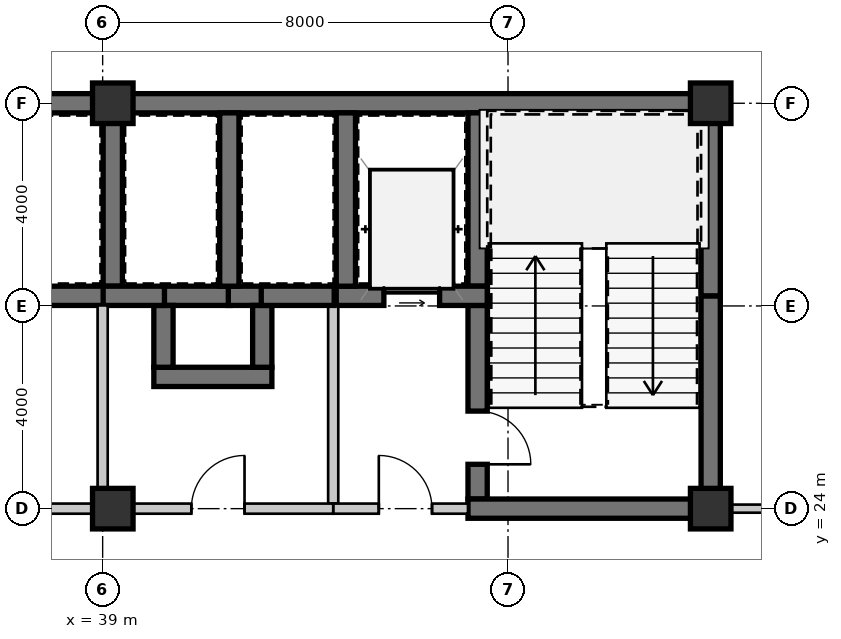
"""IFC4 building model, lengths in metres.
Left out: names, types, materials, properties, quantities, classifications, styles, units other than length and angle.
Written with IfcOpenShell. Run it as: python <this file> out.ifc"""

import sys

from ifc_helpers import new_model, si_unit, direction, frame, frame_2d, origin, origin_2d, place, context, subcontext, project, spatial, rectangle, extrude, source, transform, mapped, element, fill, save


model = new_model("IFC4")
c1 = context("Model", 3, precision=1e-05, world=origin(), true_north=direction((0.0, 1.0)))
c2 = subcontext(c1, "Body", "Model", "MODEL_VIEW")
j1 = project(units=[si_unit("LENGTHUNIT", "METRE"), si_unit("PLANEANGLEUNIT", "RADIAN")], contexts=[c1])
p1 = place(None, origin())
s1 = spatial("IfcSite", under=j1, at=p1, CompositionType="ELEMENT")
p2 = place(p1, origin())
s2 = spatial("IfcBuilding", under=s1, at=p2, CompositionType="ELEMENT")
p3 = place(p2, frame((0.0, 0.0, 38.85)))
s3 = spatial("IfcBuildingStorey", under=s2, at=p3, CompositionType="ELEMENT", Elevation=38.85)
m1 = source(origin(), c2, "Body", "SweptSolid", [
    extrude(rectangle(XDim=0.8, YDim=0.8, at=origin_2d()), origin(), (0.0, 0.0, 1.0), 3.15),
])
for number, where, z_axis, x_axis in (
    (1, (39.2, 24.0, 0.0), (0.0, 0.0, 1.0), (1.0, 0.0, 0.0)),
    (2, (51.0, 24.0, 0.0), (0.0, 0.0, 1.0), (1.0, 0.0, 0.0)),
    (3, (39.2, 32.0, 0.0), (0.0, 0.0, 1.0), (1.0, 0.0, 0.0)),
    (4, (51.0, 32.0, 0.0), (0.0, 0.0, 1.0), (1.0, 0.0, 0.0)),
):
    element("IfcColumn", number, at=place(p3, frame(where, z_axis=z_axis, x_axis=x_axis)), inside=s3, PredefinedType="COLUMN", context=c2, shape_type="MappedRepresentation", body=[
        mapped(m1, transform((0.0, 0.0, 0.0), scale=1.0)),
    ])
m2 = source(origin(), c2, "Body", "SweptSolid", [
    extrude(rectangle(XDim=11.2, YDim=0.38, at=frame_2d((5.6, 0.0))), origin(), (0.0, 0.0, 1.0), 2.93),
])
p4 = place(p3, frame((28.0, 32.0, 0.0), z_axis=(0.0, 0.0, 1.0), x_axis=(1.0, 0.0, 0.0)))
e5 = element("IfcWall", 5, at=p4, inside=s3, PredefinedType="SHEAR", context=c2, shape_type="MappedRepresentation", body=[
    mapped(m2, transform((0.0, 0.0, 0.0), scale=1.0)),
])
m3 = source(origin(), c2, "Body", "SweptSolid", [
    extrude(rectangle(XDim=11.99, YDim=0.38, at=frame_2d((5.995, 0.0))), origin(), (0.0, 0.0, 1.0), 2.93),
])
p5 = place(p3, frame((39.2, 32.0, 0.0), z_axis=(0.0, 0.0, 1.0), x_axis=(1.0, 0.0, 0.0)))
e6 = element("IfcWall", 6, at=p5, inside=s3, PredefinedType="SHEAR", context=c2, shape_type="MappedRepresentation", body=[
    mapped(m3, transform((0.0, 0.0, 0.0), scale=1.0)),
])
m4 = source(origin(), c2, "Body", "SweptSolid", [
    extrude(rectangle(XDim=4.01, YDim=0.38, at=frame_2d((2.005, 0.0))), origin(), (0.0, 0.0, 1.0), 2.93),
])
p6 = place(p3, frame((51.0, 24.19, 0.0), z_axis=(0.0, 0.0, 1.0), x_axis=(0.0, 1.0, 0.0)))
e7 = element("IfcWall", 7, at=p6, inside=s3, PredefinedType="SHEAR", context=c2, shape_type="MappedRepresentation", body=[
    mapped(m4, transform((0.0, 0.0, 0.0), scale=1.0)),
])
m5 = source(origin(), c2, "Body", "SweptSolid", [
    extrude(rectangle(XDim=3.61, YDim=0.38, at=frame_2d((1.805, 0.0))), origin(), (0.0, 0.0, 1.0), 2.93),
])
p7 = place(p3, frame((51.0, 28.2, 0.0), z_axis=(0.0, 0.0, 1.0), x_axis=(0.0, 1.0, 0.0)))
e8 = element("IfcWall", 8, at=p7, inside=s3, PredefinedType="SHEAR", context=c2, shape_type="MappedRepresentation", body=[
    mapped(m5, transform((0.0, 0.0, 0.0), scale=1.0)),
])
m6 = source(origin(), c2, "Body", "SweptSolid", [
    extrude(rectangle(XDim=3.42, YDim=0.38, at=frame_2d((1.71, 0.0))), origin(), (0.0, 0.0, 1.0), 2.93),
])
p8 = place(p3, frame((46.4, 31.81, 0.0), z_axis=(0.0, 0.0, 1.0), x_axis=(0.0, -1.0, 0.0)))
e9 = element("IfcWall", 9, at=p8, inside=s3, PredefinedType="SHEAR", context=c2, shape_type="MappedRepresentation", body=[
    mapped(m6, transform((0.0, 0.0, 0.0), scale=1.0)),
])
m7 = source(origin(), c2, "Body", "SweptSolid", [
    extrude(rectangle(XDim=3.82, YDim=0.38, at=frame_2d((1.91, 0.0))), origin(), (0.0, 0.0, 1.0), 2.93),
])
p9 = place(p3, frame((46.4, 28.01, 0.0), z_axis=(0.0, 0.0, 1.0), x_axis=(0.0, -1.0, 0.0)))
e10 = element("IfcWall", 10, at=p9, inside=s3, PredefinedType="SHEAR", context=c2, shape_type="MappedRepresentation", body=[
    mapped(m7, transform((0.0, 0.0, 0.0), scale=1.0)),
])
m8 = source(origin(), c2, "Body", "SweptSolid", [
    extrude(rectangle(XDim=1.05, YDim=2.1, at=frame_2d((0.525, 1.05))), frame((0.0, 0.2, 0.0), z_axis=(0.0, -1.0, 0.0), x_axis=(1.0, 0.0, 0.0)), (0.0, 0.0, 1.0), 0.4),
])
p10 = place(p9, frame((2.085, 0.0, 0.0)))
e11 = element("IfcOpeningElement", 11, at=p10, cuts=e10, PredefinedType="OPENING", context=c2, shape_type="MappedRepresentation", body=[
    mapped(m8, transform((0.0, 0.0, 0.0), scale=1.0)),
])
m9 = source(origin(), c2, "Body", "SweptSolid", [
    extrude(rectangle(XDim=4.98, YDim=0.38, at=frame_2d((2.49, 0.0))), origin(), (0.0, 0.0, 1.0), 2.93),
])
p11 = place(p3, frame((46.21, 24.0, 0.0), z_axis=(0.0, 0.0, 1.0), x_axis=(1.0, 0.0, 0.0)))
e12 = element("IfcWall", 12, at=p11, inside=s3, PredefinedType="SHEAR", context=c2, shape_type="MappedRepresentation", body=[
    mapped(m9, transform((0.0, 0.0, 0.0), scale=1.0)),
])
m10 = source(origin(), c2, "Body", "SweptSolid", [
    extrude(rectangle(XDim=2.98, YDim=0.38, at=frame_2d((1.49, 0.0))), origin(), (0.0, 0.0, 1.0), 2.93),
])
p12 = place(p3, frame((43.61, 28.2, 0.0), z_axis=(0.0, 0.0, 1.0), x_axis=(1.0, 0.0, 0.0)))
e13 = element("IfcWall", 13, at=p12, inside=s3, PredefinedType="SHEAR", context=c2, shape_type="MappedRepresentation", body=[
    mapped(m10, transform((0.0, 0.0, 0.0), scale=1.0)),
])
m11 = source(origin(), c2, "Body", "SweptSolid", [
    extrude(rectangle(XDim=1.1, YDim=2.15, at=frame_2d((0.55, 1.075))), frame((0.0, 0.2, 0.0), z_axis=(0.0, -1.0, 0.0), x_axis=(1.0, 0.0, 0.0)), (0.0, 0.0, 1.0), 0.4),
])
p13 = place(p12, frame((0.94, 0.0, 0.0)))
e14 = element("IfcOpeningElement", 14, at=p13, cuts=e13, PredefinedType="OPENING", context=c2, shape_type="MappedRepresentation", body=[
    mapped(m11, transform((0.0, 0.0, 0.0), scale=1.0)),
])
p14 = place(p3, frame((43.8, 31.81, 0.0), z_axis=(0.0, 0.0, 1.0), x_axis=(0.0, -1.0, 0.0)))
e15 = element("IfcWall", 15, at=p14, inside=s3, PredefinedType="SHEAR", context=c2, shape_type="MappedRepresentation", body=[
    mapped(m6, transform((0.0, 0.0, 0.0), scale=1.0)),
])
m12 = source(origin(), c2, "Body", "SweptSolid", [
    extrude(rectangle(XDim=3.91, YDim=0.2, at=frame_2d((1.955, 0.0))), origin(), (0.0, 0.0, 1.0), 2.93),
])
p15 = place(p3, frame((43.55, 28.01, 0.0), z_axis=(0.0, 0.0, 1.0), x_axis=(0.0, -1.0, 0.0)))
e16 = element("IfcWall", 16, at=p15, inside=s3, PredefinedType="SOLIDWALL", context=c2, shape_type="MappedRepresentation", body=[
    mapped(m12, transform((0.0, 0.0, 0.0), scale=1.0)),
])
m13 = source(origin(), c2, "Body", "SweptSolid", [
    extrude(rectangle(XDim=2.66, YDim=0.2, at=frame_2d((1.33, 0.0))), origin(), (0.0, 0.0, 1.0), 2.397),
])
p16 = place(p3, frame((43.55, 24.0, 0.0), z_axis=(0.0, 0.0, 1.0), x_axis=(1.0, 0.0, 0.0)))
e17 = element("IfcWall", 17, at=p16, inside=s3, PredefinedType="SOLIDWALL", context=c2, shape_type="MappedRepresentation", body=[
    mapped(m13, transform((0.0, 0.0, 0.0), scale=1.0)),
])
m14 = source(origin(), c2, "Body", "SweptSolid", [
    extrude(rectangle(XDim=1.05, YDim=2.1, at=frame_2d((0.525, 1.05))), frame((0.0, 0.11, 0.0), z_axis=(0.0, -1.0, 0.0), x_axis=(1.0, 0.0, 0.0)), (0.0, 0.0, 1.0), 0.22),
])
p17 = place(p16, frame((0.9, 0.0, 0.0)))
e18 = element("IfcOpeningElement", 18, at=p17, cuts=e17, PredefinedType="OPENING", context=c2, shape_type="MappedRepresentation", body=[
    mapped(m14, transform((0.0, 0.0, 0.0), scale=1.0)),
])
m15 = source(origin(), c2, "Body", "SweptSolid", [
    extrude(rectangle(XDim=1.32, YDim=0.38, at=frame_2d((0.66, 0.0))), origin(), (0.0, 0.0, 1.0), 2.93),
])
p18 = place(p3, frame((41.52, 28.2, 0.0), z_axis=(0.0, 0.0, 1.0), x_axis=(-1.0, 0.0, 0.0)))
e19 = element("IfcWall", 19, at=p18, inside=s3, PredefinedType="SHEAR", context=c2, shape_type="MappedRepresentation", body=[
    mapped(m15, transform((0.0, 0.0, 0.0), scale=1.0)),
])
m16 = source(origin(), c2, "Body", "SweptSolid", [
    extrude(rectangle(XDim=0.67, YDim=0.38, at=frame_2d((0.335, 0.0))), origin(), (0.0, 0.0, 1.0), 2.93),
])
p19 = place(p3, frame((42.15, 28.2, 0.0), z_axis=(0.0, 0.0, 1.0), x_axis=(-1.0, 0.0, 0.0)))
e20 = element("IfcWall", 20, at=p19, inside=s3, PredefinedType="SHEAR", context=c2, shape_type="MappedRepresentation", body=[
    mapped(m16, transform((0.0, 0.0, 0.0), scale=1.0)),
])
m17 = source(origin(), c2, "Body", "SweptSolid", [
    extrude(rectangle(XDim=2.33, YDim=0.38, at=frame_2d((1.165, 0.0))), origin(), (0.0, 0.0, 1.0), 2.93),
])
p20 = place(p3, frame((40.01, 26.6, 0.0), z_axis=(0.0, 0.0, 1.0), x_axis=(1.0, 0.0, 0.0)))
e21 = element("IfcWall", 21, at=p20, inside=s3, PredefinedType="SHEAR", context=c2, shape_type="MappedRepresentation", body=[
    mapped(m17, transform((0.0, 0.0, 0.0), scale=1.0)),
])
m18 = source(origin(), c2, "Body", "SweptSolid", [
    extrude(rectangle(XDim=1.22, YDim=0.38, at=frame_2d((0.61, 0.0))), origin(), (0.0, 0.0, 1.0), 2.93),
])
for number, where, z_axis, x_axis in (
    (22, (40.2, 28.01, 0.0), (0.0, 0.0, 1.0), (0.0, -1.0, 0.0)),
    (23, (42.15, 26.79, 0.0), (0.0, 0.0, 1.0), (0.0, 1.0, 0.0)),
):
    element("IfcWall", number, at=place(p3, frame(where, z_axis=z_axis, x_axis=x_axis)), inside=s3, PredefinedType="SHEAR", context=c2, shape_type="MappedRepresentation", body=[
        mapped(m18, transform((0.0, 0.0, 0.0), scale=1.0)),
    ])
p21 = place(p3, frame((39.2, 28.39, 0.0), z_axis=(0.0, 0.0, 1.0), x_axis=(0.0, 1.0, 0.0)))
e24 = element("IfcWall", 24, at=p21, inside=s3, PredefinedType="SHEAR", context=c2, shape_type="MappedRepresentation", body=[
    mapped(m6, transform((0.0, 0.0, 0.0), scale=1.0)),
])
m19 = source(origin(), c2, "Body", "SweptSolid", [
    extrude(rectangle(XDim=2.36, YDim=0.38, at=frame_2d((1.18, 0.0))), origin(), (0.0, 0.0, 1.0), 2.93),
])
p22 = place(p3, frame((36.66, 28.2, 0.0), z_axis=(0.0, 0.0, 1.0), x_axis=(1.0, 0.0, 0.0)))
e25 = element("IfcWall", 25, at=p22, inside=s3, PredefinedType="SHEAR", context=c2, shape_type="MappedRepresentation", body=[
    mapped(m19, transform((0.0, 0.0, 0.0), scale=1.0)),
])
p23 = place(p3, frame((41.5, 28.39, 0.0), z_axis=(0.0, 0.0, 1.0), x_axis=(0.0, 1.0, 0.0)))
e26 = element("IfcWall", 26, at=p23, inside=s3, PredefinedType="SHEAR", context=c2, shape_type="MappedRepresentation", body=[
    mapped(m6, transform((0.0, 0.0, 0.0), scale=1.0)),
])
m20 = source(origin(), c2, "Body", "SweptSolid", [
    extrude(rectangle(XDim=1.21, YDim=0.38, at=frame_2d((0.605, 0.0))), origin(), (0.0, 0.0, 1.0), 2.93),
])
p24 = place(p3, frame((39.01, 28.2, 0.0), z_axis=(0.0, 0.0, 1.0), x_axis=(1.0, 0.0, 0.0)))
e27 = element("IfcWall", 27, at=p24, inside=s3, PredefinedType="SHEAR", context=c2, shape_type="MappedRepresentation", body=[
    mapped(m20, transform((0.0, 0.0, 0.0), scale=1.0)),
])
m21 = source(origin(), c2, "Body", "SweptSolid", [
    extrude(rectangle(XDim=1.44, YDim=0.38, at=frame_2d((0.72, 0.0))), origin(), (0.0, 0.0, 1.0), 2.93),
])
p25 = place(p3, frame((42.13, 28.2, 0.0), z_axis=(0.0, 0.0, 1.0), x_axis=(1.0, 0.0, 0.0)))
e28 = element("IfcWall", 28, at=p25, inside=s3, PredefinedType="SHEAR", context=c2, shape_type="MappedRepresentation", body=[
    mapped(m21, transform((0.0, 0.0, 0.0), scale=1.0)),
])
p26 = place(p3, frame((39.0, 28.01, 0.0), z_axis=(0.0, 0.0, 1.0), x_axis=(0.0, -1.0, 0.0)))
e29 = element("IfcWall", 29, at=p26, inside=s3, PredefinedType="SOLIDWALL", context=c2, shape_type="MappedRepresentation", body=[
    mapped(m12, transform((0.0, 0.0, 0.0), scale=1.0)),
])
m22 = source(origin(), c2, "Body", "SweptSolid", [
    extrude(rectangle(XDim=3.85, YDim=0.2, at=frame_2d((1.925, 0.0))), origin(), (0.0, 0.0, 1.0), 2.47),
])
p27 = place(p3, frame((39.0, 24.0, 0.0), z_axis=(0.0, 0.0, 1.0), x_axis=(-1.0, 0.0, 0.0)))
e30 = element("IfcWall", 30, at=p27, inside=s3, PredefinedType="SOLIDWALL", context=c2, shape_type="MappedRepresentation", body=[
    mapped(m22, transform((0.0, 0.0, 0.0), scale=1.0)),
])
p28 = place(p27, frame((1.4, 0.0, 0.0)))
e31 = element("IfcOpeningElement", 31, at=p28, cuts=e30, PredefinedType="OPENING", context=c2, shape_type="MappedRepresentation", body=[
    mapped(m14, transform((0.0, 0.0, 0.0), scale=1.0)),
])
m23 = source(origin(), c2, "Body", "SweptSolid", [
    extrude(rectangle(XDim=4.55, YDim=0.2, at=frame_2d((2.275, 0.0))), origin(), (0.0, 0.0, 1.0), 2.397),
])
p29 = place(p3, frame((43.55, 24.0, 0.0), z_axis=(0.0, 0.0, 1.0), x_axis=(-1.0, 0.0, 0.0)))
e32 = element("IfcWall", 32, at=p29, inside=s3, PredefinedType="SOLIDWALL", context=c2, shape_type="MappedRepresentation", body=[
    mapped(m23, transform((0.0, 0.0, 0.0), scale=1.0)),
])
p30 = place(p29, frame((1.75, 0.0, 0.0)))
e33 = element("IfcOpeningElement", 33, at=p30, cuts=e32, PredefinedType="OPENING", context=c2, shape_type="MappedRepresentation", body=[
    mapped(m14, transform((0.0, 0.0, 0.0), scale=1.0)),
])
m24 = source(origin(), c2, "Body", "SweptSolid", [
    extrude(rectangle(XDim=4.13, YDim=0.16, at=frame_2d((2.065, 0.0))), origin(), (0.0, 0.0, 1.0), 2.93),
])
p31 = place(p3, frame((51.19, 24.0, 0.0), z_axis=(0.0, 0.0, 1.0), x_axis=(1.0, 0.0, 0.0)))
e34 = element("IfcWall", 34, at=p31, inside=s3, PredefinedType="PARTITIONING", context=c2, shape_type="MappedRepresentation", body=[
    mapped(m24, transform((0.0, 0.0, 0.0), scale=1.0)),
])
m25 = source(origin(), c2, "Body", "SweptSolid", [
    extrude(rectangle(XDim=1.05, YDim=2.1, at=frame_2d((0.525, 1.05))), frame((0.0, 0.025, 0.0), z_axis=(0.0, -1.0, 0.0), x_axis=(1.0, 0.0, 0.0)), (0.0, 0.0, 1.0), 0.05),
])
p32 = place(p10, origin())
e35 = element("IfcDoor", 35, at=p32, inside=s3, OperationType="SINGLE_SWING_RIGHT", PredefinedType="DOOR", context=c2, shape_type="MappedRepresentation", body=[
    mapped(m25, transform((0.0, 0.0, 0.0), scale=1.0)),
])
fill(e11, e35)
m26 = source(origin(), c2, "Body", "SweptSolid", [
    extrude(rectangle(XDim=1.1, YDim=2.15, at=frame_2d((0.55, 1.075))), frame((0.0, 0.025, 0.0), z_axis=(0.0, -1.0, 0.0), x_axis=(1.0, 0.0, 0.0)), (0.0, 0.0, 1.0), 0.05),
])
p33 = place(p13, origin())
e36 = element("IfcDoor", 36, at=p33, inside=s3, OperationType="SLIDING_TO_LEFT", PredefinedType="DOOR", context=c2, shape_type="MappedRepresentation", body=[
    mapped(m26, transform((0.0, 0.0, 0.0), scale=1.0)),
])
fill(e14, e36)
p34 = place(p17, origin())
e37 = element("IfcDoor", 37, at=p34, inside=s3, OperationType="SINGLE_SWING_LEFT", PredefinedType="DOOR", context=c2, shape_type="MappedRepresentation", body=[
    mapped(m25, transform((0.0, 0.0, 0.0), scale=1.0)),
])
fill(e18, e37)
p35 = place(p30, frame((1.05, 0.0, 0.0), z_axis=(0.0, 0.0, 1.0), x_axis=(-1.0, 0.0, 0.0)))
e38 = element("IfcDoor", 38, at=p35, inside=s3, OperationType="SINGLE_SWING_RIGHT", PredefinedType="DOOR", context=c2, shape_type="MappedRepresentation", body=[
    mapped(m25, transform((0.0, 0.0, 0.0), scale=1.0)),
])
fill(e33, e38)
save(model, sys.argv[1])
